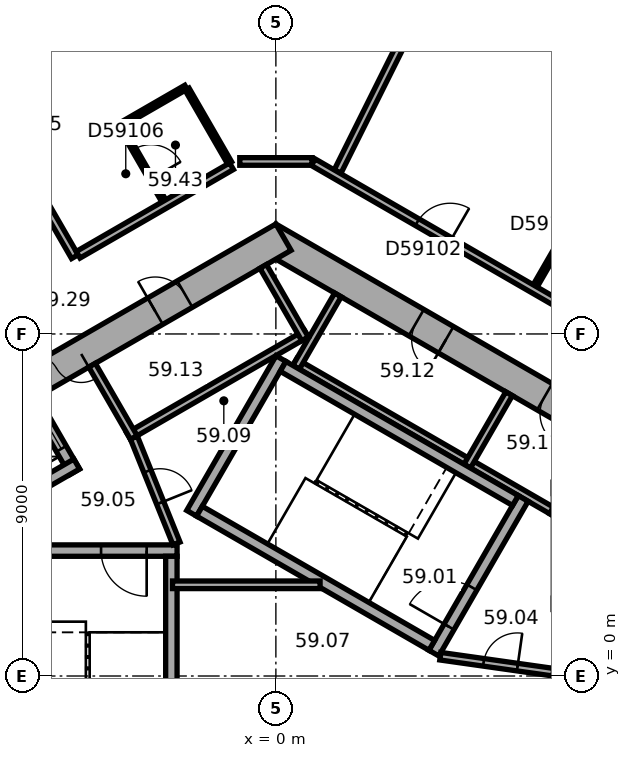
"""IFC4 building model, lengths in metres.
Left out: names, types, materials, properties, quantities, classifications, styles, units other than length and angle.
Written with IfcOpenShell. Run it as: python <this file> out.ifc"""

import sys

from ifc_helpers import new_model, si_unit, direction, frame, frame_2d, origin, place, context, subcontext, project, spatial, rectangle, extrude, element, fill, save


model = new_model("IFC4")
c1 = context("Model", 3, precision=1e-05, world=origin(), true_north=direction((0.0, 1.0)))
c2 = subcontext(c1, "Body", "Model", "MODEL_VIEW")
j1 = project(units=[si_unit("LENGTHUNIT", "METRE"), si_unit("PLANEANGLEUNIT", "RADIAN")], contexts=[c1])
p1 = place(None, origin())
s1 = spatial("IfcSite", under=j1, at=p1, CompositionType="ELEMENT")
p2 = place(p1, origin())
s2 = spatial("IfcBuilding", under=s1, at=p2, CompositionType="ELEMENT")
p3 = place(p2, frame((0.0, 0.0, 240.2)))
s3 = spatial("IfcBuildingStorey", under=s2, at=p3, CompositionType="ELEMENT", Elevation=240.2)
p4 = place(p3, frame((10.1, 5.6, 0.0), z_axis=(0.0, 0.0, 1.0), x_axis=(-0.866023897231, 0.500002609418, 0.0)))
e1 = element("IfcWall", 1, at=p4, inside=s3, PredefinedType="SHEAR", context=c2, shape_type="SweptSolid", body=[
    extrude(rectangle(XDim=11.894, YDim=0.8, at=frame_2d((5.947, 0.0))), origin(), (0.0, 0.0, 1.0), 3.7),
])
p5 = place(p4, frame((2.597, 0.0, 0.0)))
e2 = element("IfcOpeningElement", 2, at=p5, cuts=e1, PredefinedType="OPENING", context=c2, shape_type="SweptSolid", body=[
    extrude(rectangle(XDim=0.9, YDim=2.1, at=frame_2d((0.45, 1.05))), frame((0.0, 0.41, 0.0), z_axis=(0.0, -1.0, 0.0), x_axis=(1.0, 0.0, 0.0)), (0.0, 0.0, 1.0), 0.82),
])
p6 = place(p4, frame((6.497, 0.0, 0.0)))
e3 = element("IfcOpeningElement", 3, at=p6, cuts=e1, PredefinedType="OPENING", context=c2, shape_type="SweptSolid", body=[
    extrude(rectangle(XDim=0.9, YDim=2.1, at=frame_2d((0.45, 1.05))), frame((0.0, 0.41, 0.0), z_axis=(0.0, -1.0, 0.0), x_axis=(1.0, 0.0, 0.0)), (0.0, 0.0, 1.0), 0.82),
])
p7 = place(p3, frame((0.2, 11.547, 0.0), z_axis=(0.0, 0.0, 1.0), x_axis=(-0.866023897231, -0.500002609418, 0.0)))
e4 = element("IfcWall", 4, at=p7, inside=s3, PredefinedType="SHEAR", context=c2, shape_type="SweptSolid", body=[
    extrude(rectangle(XDim=11.894, YDim=0.8, at=frame_2d((5.947, 0.0))), origin(), (0.0, 0.0, 1.0), 3.7),
])
p8 = place(p7, frame((6.147, 0.0, 0.0)))
e5 = element("IfcOpeningElement", 5, at=p8, cuts=e4, PredefinedType="OPENING", context=c2, shape_type="SweptSolid", body=[
    extrude(rectangle(XDim=1.5, YDim=2.1, at=frame_2d((0.75, 1.05))), frame((0.0, 0.41, 0.0), z_axis=(0.0, -1.0, 0.0), x_axis=(1.0, 0.0, 0.0)), (0.0, 0.0, 1.0), 0.82),
])
p9 = place(p7, frame((2.997, 0.0, 0.0)))
e6 = element("IfcOpeningElement", 6, at=p9, cuts=e4, PredefinedType="OPENING", context=c2, shape_type="SweptSolid", body=[
    extrude(rectangle(XDim=0.9, YDim=2.1, at=frame_2d((0.45, 1.05))), frame((0.0, 0.41, 0.0), z_axis=(0.0, -1.0, 0.0), x_axis=(1.0, 0.0, 0.0)), (0.0, 0.0, 1.0), 0.82),
])
p10 = place(p3, frame((18.299, 13.727, 0.0), z_axis=(0.0, 0.0, 1.0), x_axis=(-0.894934554817, 0.44619742558, 0.0)))
e7 = element("IfcWall", 7, at=p10, inside=s3, PredefinedType="STANDARD", context=c2, shape_type="SweptSolid", body=[
    extrude(rectangle(XDim=18.841, YDim=0.2, at=frame_2d((9.421, 0.0))), origin(), (0.0, 0.0, 1.0), 3.7),
])
p11 = place(p10, frame((1.253, 0.0, 0.9)))
e8 = element("IfcOpeningElement", 8, at=p11, cuts=e7, PredefinedType="OPENING", context=c2, shape_type="SweptSolid", body=[
    extrude(rectangle(XDim=2.2, YDim=2.0, at=frame_2d((1.1, 1.0))), frame((0.0, 0.11, 0.0), z_axis=(0.0, -1.0, 0.0), x_axis=(1.0, 0.0, 0.0)), (0.0, 0.0, 1.0), 0.22),
])
p12 = place(p10, frame((4.786, 0.0, 0.9)))
e9 = element("IfcOpeningElement", 9, at=p12, cuts=e7, PredefinedType="OPENING", context=c2, shape_type="SweptSolid", body=[
    extrude(rectangle(XDim=2.2, YDim=2.0, at=frame_2d((1.1, 1.0))), frame((0.0, 0.11, 0.0), z_axis=(0.0, -1.0, 0.0), x_axis=(1.0, 0.0, 0.0)), (0.0, 0.0, 1.0), 0.22),
])
p13 = place(p10, frame((8.32, 0.0, 0.9)))
e10 = element("IfcOpeningElement", 10, at=p13, cuts=e7, PredefinedType="OPENING", context=c2, shape_type="SweptSolid", body=[
    extrude(rectangle(XDim=2.2, YDim=2.0, at=frame_2d((1.1, 1.0))), frame((0.0, 0.11, 0.0), z_axis=(0.0, -1.0, 0.0), x_axis=(1.0, 0.0, 0.0)), (0.0, 0.0, 1.0), 0.22),
])
p14 = place(p10, frame((11.854, 0.0, 0.9)))
e11 = element("IfcOpeningElement", 11, at=p14, cuts=e7, PredefinedType="OPENING", context=c2, shape_type="SweptSolid", body=[
    extrude(rectangle(XDim=2.2, YDim=2.0, at=frame_2d((1.1, 1.0))), frame((0.0, 0.11, 0.0), z_axis=(0.0, -1.0, 0.0), x_axis=(1.0, 0.0, 0.0)), (0.0, 0.0, 1.0), 0.22),
])
p15 = place(p10, frame((15.387, 0.0, 0.9)))
e12 = element("IfcOpeningElement", 12, at=p15, cuts=e7, PredefinedType="OPENING", context=c2, shape_type="SweptSolid", body=[
    extrude(rectangle(XDim=2.2, YDim=2.0, at=frame_2d((1.1, 1.0))), frame((0.0, 0.11, 0.0), z_axis=(0.0, -1.0, 0.0), x_axis=(1.0, 0.0, 0.0)), (0.0, 0.0, 1.0), 0.22),
])
p16 = place(p3, frame((-2.786, 22.005, 0.0), z_axis=(0.0, 0.0, 1.0), x_axis=(-0.866026555358, -0.49999800541, 0.0)))
e13 = element("IfcWall", 13, at=p16, inside=s3, PredefinedType="STANDARD", context=c2, shape_type="SweptSolid", body=[
    extrude(rectangle(XDim=18.841, YDim=0.2, at=frame_2d((9.421, 0.0))), origin(), (0.0, 0.0, 1.0), 3.7),
])
p17 = place(p16, frame((1.254, 0.0, 0.9)))
e14 = element("IfcOpeningElement", 14, at=p17, cuts=e13, PredefinedType="OPENING", context=c2, shape_type="SweptSolid", body=[
    extrude(rectangle(XDim=2.2, YDim=2.0, at=frame_2d((1.1, 1.0))), frame((0.0, 0.11, 0.0), z_axis=(0.0, -1.0, 0.0), x_axis=(1.0, 0.0, 0.0)), (0.0, 0.0, 1.0), 0.22),
])
p18 = place(p16, frame((4.788, 0.0, 0.9)))
e15 = element("IfcOpeningElement", 15, at=p18, cuts=e13, PredefinedType="OPENING", context=c2, shape_type="SweptSolid", body=[
    extrude(rectangle(XDim=2.2, YDim=2.0, at=frame_2d((1.1, 1.0))), frame((0.0, 0.11, 0.0), z_axis=(0.0, -1.0, 0.0), x_axis=(1.0, 0.0, 0.0)), (0.0, 0.0, 1.0), 0.22),
])
p19 = place(p16, frame((8.321, 0.0, 0.9)))
e16 = element("IfcOpeningElement", 16, at=p19, cuts=e13, PredefinedType="OPENING", context=c2, shape_type="SweptSolid", body=[
    extrude(rectangle(XDim=2.2, YDim=2.0, at=frame_2d((1.1, 1.0))), frame((0.0, 0.11, 0.0), z_axis=(0.0, -1.0, 0.0), x_axis=(1.0, 0.0, 0.0)), (0.0, 0.0, 1.0), 0.22),
])
p20 = place(p16, frame((11.855, 0.0, 0.9)))
e17 = element("IfcOpeningElement", 17, at=p20, cuts=e13, PredefinedType="OPENING", context=c2, shape_type="SweptSolid", body=[
    extrude(rectangle(XDim=2.2, YDim=2.0, at=frame_2d((1.1, 1.0))), frame((0.0, 0.11, 0.0), z_axis=(0.0, -1.0, 0.0), x_axis=(1.0, 0.0, 0.0)), (0.0, 0.0, 1.0), 0.22),
])
p21 = place(p16, frame((15.389, 0.0, 0.9)))
e18 = element("IfcOpeningElement", 18, at=p21, cuts=e13, PredefinedType="OPENING", context=c2, shape_type="SweptSolid", body=[
    extrude(rectangle(XDim=2.2, YDim=2.0, at=frame_2d((1.1, 1.0))), frame((0.0, 0.11, 0.0), z_axis=(0.0, -1.0, 0.0), x_axis=(1.0, 0.0, 0.0)), (0.0, 0.0, 1.0), 0.22),
])
p22 = place(p3, frame((7.424, 4.259, 0.0), z_axis=(0.0, 0.0, 1.0), x_axis=(-0.866026010844, 0.49999894854, 0.0)))
e19 = element("IfcWall", 19, at=p22, inside=s3, PredefinedType="PARTITIONING", context=c2, shape_type="SweptSolid", body=[
    extrude(rectangle(XDim=8.0, YDim=0.2, at=frame_2d((4.0, 0.0))), origin(), (0.0, 0.0, 1.0), 3.42),
])
for number, where, z_axis, x_axis in (
    (20, (7.287, 4.222, 0.0), (0.0, 0.0, 1.0), (0.5, 0.866, 0.0)),
    (21, (5.036, 5.522, 0.0), (0.0, 0.0, 1.0), (0.5, 0.866, 0.0)),
    (22, (0.532, 8.122, 0.0), (0.0, 0.0, 1.0), (0.5, 0.866, 0.0)),
):
    element("IfcWall", number, at=place(p3, frame(where, z_axis=z_axis, x_axis=x_axis)), inside=s3, PredefinedType="PARTITIONING", context=c2, shape_type="SweptSolid", body=[
        extrude(rectangle(XDim=2.2, YDim=0.2, at=frame_2d((1.1, 0.0))), origin(), (0.0, 0.0, 1.0), 3.42),
    ])
p23 = place(p3, frame((0.803, 9.009, 0.0), z_axis=(0.0, 0.0, 1.0), x_axis=(-0.866028230842, -0.499995103361, 0.0)))
e23 = element("IfcWall", 23, at=p23, inside=s3, PredefinedType="PARTITIONING", context=c2, shape_type="SweptSolid", body=[
    extrude(rectangle(XDim=5.4, YDim=0.2, at=frame_2d((2.7, 0.0))), origin(), (0.0, 0.0, 1.0), 3.42),
])
p24 = place(p3, frame((0.767, 8.872, 0.0), z_axis=(0.0, 0.0, 1.0), x_axis=(-0.499994660107, 0.866028486751, 0.0)))
e24 = element("IfcWall", 24, at=p24, inside=s3, PredefinedType="PARTITIONING", context=c2, shape_type="SweptSolid", body=[
    extrude(rectangle(XDim=2.2, YDim=0.2, at=frame_2d((1.1, 0.0))), origin(), (0.0, 0.0, 1.0), 3.42),
])
p25 = place(p3, frame((-3.737, 6.272, 0.0), z_axis=(0.0, 0.0, 1.0), x_axis=(-0.50002983664, 0.866008176907, 0.0)))
e25 = element("IfcWall", 25, at=p25, inside=s3, PredefinedType="PARTITIONING", context=c2, shape_type="SweptSolid", body=[
    extrude(rectangle(XDim=2.2, YDim=0.2, at=frame_2d((1.1, 0.0))), origin(), (0.0, 0.0, 1.0), 3.42),
])
p26 = place(p3, frame((4.158, 0.602, 0.0), z_axis=(0.0, 0.0, 1.0), x_axis=(0.499977259774, 0.866038532462, 0.0)))
e26 = element("IfcWall", 26, at=p26, inside=s3, PredefinedType="SHEAR", context=c2, shape_type="SweptSolid", body=[
    extrude(rectangle(XDim=4.7, YDim=0.3, at=frame_2d((2.35, 0.0))), origin(), (0.0, 0.0, 1.0), 3.42),
])
p27 = place(p26, frame((0.8, 0.0, 0.0)))
e27 = element("IfcOpeningElement", 27, at=p27, cuts=e26, PredefinedType="OPENING", context=c2, shape_type="SweptSolid", body=[
    extrude(rectangle(XDim=1.2, YDim=2.1, at=frame_2d((0.6, 1.05))), frame((0.0, 0.16, 0.0), z_axis=(0.0, -1.0, 0.0), x_axis=(1.0, 0.0, 0.0)), (0.0, 0.0, 1.0), 0.32),
])
p28 = place(p3, frame((-2.216, 4.282, 0.0), z_axis=(0.0, 0.0, 1.0), x_axis=(0.499977259774, 0.866038532462, 0.0)))
e28 = element("IfcWall", 28, at=p28, inside=s3, PredefinedType="SHEAR", context=c2, shape_type="SweptSolid", body=[
    extrude(rectangle(XDim=4.7, YDim=0.3, at=frame_2d((2.35, 0.0))), origin(), (0.0, 0.0, 1.0), 3.42),
])
for number, where, z_axis, x_axis in (
    (29, (4.103, 0.807, 0.0), (0.0, 0.0, 1.0), (-0.866, 0.5, 0.0)),
    (30, (6.303, 4.617, 0.0), (0.0, 0.0, 1.0), (-0.866, 0.5, 0.0)),
):
    element("IfcWall", number, at=place(p3, frame(where, z_axis=z_axis, x_axis=x_axis)), inside=s3, PredefinedType="SHEAR", context=c2, shape_type="SweptSolid", body=[
        extrude(rectangle(XDim=7.06, YDim=0.3, at=frame_2d((3.53, 0.0))), origin(), (0.0, 0.0, 1.0), 3.42),
    ])
p29 = place(p3, frame((-2.6, 3.3, 0.0), z_axis=(0.0, 0.0, 1.0), x_axis=(-1.0, 0.0, 0.0)))
e31 = element("IfcWall", 31, at=p29, inside=s3, PredefinedType="SHEAR", context=c2, shape_type="SweptSolid", body=[
    extrude(rectangle(XDim=4.7, YDim=0.3, at=frame_2d((2.35, 0.0))), origin(), (0.0, 0.0, 1.0), 3.42),
])
p30 = place(p29, frame((0.8, 0.0, 0.0)))
e32 = element("IfcOpeningElement", 32, at=p30, cuts=e31, PredefinedType="OPENING", context=c2, shape_type="SweptSolid", body=[
    extrude(rectangle(XDim=1.2, YDim=2.1, at=frame_2d((0.6, 1.05))), frame((0.0, 0.16, 0.0), z_axis=(0.0, -1.0, 0.0), x_axis=(1.0, 0.0, 0.0)), (0.0, 0.0, 1.0), 0.32),
])
p31 = place(p3, frame((-2.75, 3.15, 0.0), z_axis=(0.0, 0.0, 1.0), x_axis=(0.0, -1.0, 0.0)))
e33 = element("IfcWall", 33, at=p31, inside=s3, PredefinedType="SHEAR", context=c2, shape_type="SweptSolid", body=[
    extrude(rectangle(XDim=7.06, YDim=0.3, at=frame_2d((3.53, 0.0))), origin(), (0.0, 0.0, 1.0), 3.42),
])
p32 = place(p3, frame((4.327, 0.521, 0.0), z_axis=(0.0, 0.0, 1.0), x_axis=(0.990124376366, -0.14019172346, 0.0)))
e34 = element("IfcWall", 34, at=p32, inside=s3, PredefinedType="PARTITIONING", context=c2, shape_type="SweptSolid", body=[
    extrude(rectangle(XDim=3.002, YDim=0.2, at=frame_2d((1.501, 0.0))), origin(), (0.0, 0.0, 1.0), 3.42),
])
p33 = place(p32, frame((1.15, 0.0, 0.0)))
e35 = element("IfcOpeningElement", 35, at=p33, cuts=e34, PredefinedType="OPENING", context=c2, shape_type="SweptSolid", body=[
    extrude(rectangle(XDim=0.9, YDim=2.1, at=frame_2d((0.45, 1.05))), frame((0.0, 0.11, 0.0), z_axis=(0.0, -1.0, 0.0), x_axis=(1.0, 0.0, 0.0)), (0.0, 0.0, 1.0), 0.22),
])
p34 = place(p3, frame((-5.295, 5.372, 0.0), z_axis=(0.0, 0.0, 1.0), x_axis=(-0.500077893725, 0.86598042715, 0.0)))
e36 = element("IfcWall", 36, at=p34, inside=s3, PredefinedType="SHEAR", context=c2, shape_type="SweptSolid", body=[
    extrude(rectangle(XDim=2.2, YDim=0.3, at=frame_2d((1.1, 0.0))), origin(), (0.0, 0.0, 1.0), 3.42),
])
p35 = place(p34, frame((0.7, 0.0, 0.0)))
e37 = element("IfcOpeningElement", 37, at=p35, cuts=e36, PredefinedType="OPENING", context=c2, shape_type="SweptSolid", body=[
    extrude(rectangle(XDim=1.1, YDim=2.1, at=frame_2d((0.55, 1.05))), frame((0.0, 0.16, 0.0), z_axis=(0.0, -1.0, 0.0), x_axis=(1.0, 0.0, 0.0)), (0.0, 0.0, 1.0), 0.32),
])
p36 = place(p3, frame((-5.24, 5.577, 0.0), z_axis=(0.0, 0.0, 1.0), x_axis=(-0.866014461049, -0.500018952895, 0.0)))
e38 = element("IfcWall", 38, at=p36, inside=s3, PredefinedType="SHEAR", context=c2, shape_type="SweptSolid", body=[
    extrude(rectangle(XDim=3.35, YDim=0.3, at=frame_2d((1.675, 0.0))), origin(), (0.0, 0.0, 1.0), 3.42),
])
p37 = place(p3, frame((-2.615, 3.487, 0.0), z_axis=(0.0, 0.0, 1.0), x_axis=(-0.373576831041, 0.92759924068, 0.0)))
e39 = element("IfcWall", 39, at=p37, inside=s3, PredefinedType="PARTITIONING", context=c2, shape_type="SweptSolid", body=[
    extrude(rectangle(XDim=3.002, YDim=0.2, at=frame_2d((1.501, 0.0))), origin(), (0.0, 0.0, 1.0), 3.42),
])
p38 = place(p37, frame((1.15, 0.0, 0.0)))
e40 = element("IfcOpeningElement", 40, at=p38, cuts=e39, PredefinedType="OPENING", context=c2, shape_type="SweptSolid", body=[
    extrude(rectangle(XDim=0.9, YDim=2.1, at=frame_2d((0.45, 1.05))), frame((0.0, 0.11, 0.0), z_axis=(0.0, -1.0, 0.0), x_axis=(1.0, 0.0, 0.0)), (0.0, 0.0, 1.0), 0.22),
])
p39 = place(p3, frame((-2.72, 2.4, 0.0), z_axis=(0.0, 0.0, 1.0), x_axis=(1.0, 0.0, 0.0)))
e41 = element("IfcWall", 41, at=p39, inside=s3, PredefinedType="PARTITIONING", context=c2, shape_type="SweptSolid", body=[
    extrude(rectangle(XDim=3.883, YDim=0.2, at=frame_2d((1.941, 0.0))), origin(), (0.0, 0.0, 1.0), 3.42),
])
p40 = place(p3, frame((-8.965, 17.399, 0.0), z_axis=(0.0, 0.0, 1.0), x_axis=(0.499993683172, -0.866029050776, 0.0)))
e42 = element("IfcWall", 42, at=p40, inside=s3, PredefinedType="PARTITIONING", context=c2, shape_type="SweptSolid", body=[
    extrude(rectangle(XDim=7.35, YDim=0.2, at=frame_2d((3.675, 0.0))), origin(), (0.0, 0.0, 1.0), 2.87),
])
p41 = place(p40, frame((3.175, 0.0, 0.0)))
e43 = element("IfcOpeningElement", 43, at=p41, cuts=e42, PredefinedType="OPENING", context=c2, shape_type="SweptSolid", body=[
    extrude(rectangle(XDim=1.0, YDim=2.1, at=frame_2d((0.5, 1.05))), frame((0.0, 0.11, 0.0), z_axis=(0.0, -1.0, 0.0), x_axis=(1.0, 0.0, 0.0)), (0.0, 0.0, 1.0), 0.22),
])
p42 = place(p3, frame((-4.099, 14.492, 0.0), z_axis=(0.0, 0.0, 1.0), x_axis=(0.866041268327, 0.499972520799, 0.0)))
e44 = element("IfcWall", 44, at=p42, inside=s3, PredefinedType="PARTITIONING", context=c2, shape_type="SweptSolid", body=[
    extrude(rectangle(XDim=2.0, YDim=0.12, at=frame_2d((1.0, 0.0))), origin(), (0.0, 0.0, 1.0), 3.42),
])
p43 = place(p3, frame((-2.948, 12.5, 0.0), z_axis=(0.0, 0.0, 1.0), x_axis=(-0.500077830873, 0.865980463445, 0.0)))
e45 = element("IfcWall", 45, at=p43, inside=s3, PredefinedType="PARTITIONING", context=c2, shape_type="SweptSolid", body=[
    extrude(rectangle(XDim=2.24, YDim=0.12, at=frame_2d((1.12, 0.0))), origin(), (0.0, 0.0, 1.0), 3.42),
])
p44 = place(p43, frame((0.67, 0.0, 0.0)))
e46 = element("IfcOpeningElement", 46, at=p44, cuts=e45, PredefinedType="OPENING", context=c2, shape_type="SweptSolid", body=[
    extrude(rectangle(XDim=0.9, YDim=2.1, at=frame_2d((0.45, 1.05))), frame((0.0, 0.07, 0.0), z_axis=(0.0, -1.0, 0.0), x_axis=(1.0, 0.0, 0.0)), (0.0, 0.0, 1.0), 0.14),
])
p45 = place(p3, frame((-2.336, 15.44, 0.0), z_axis=(0.0, 0.0, 1.0), x_axis=(0.49999608499, -0.866027664105, 0.0)))
e47 = element("IfcWall", 47, at=p45, inside=s3, PredefinedType="PARTITIONING", context=c2, shape_type="SweptSolid", body=[
    extrude(rectangle(XDim=2.24, YDim=0.12, at=frame_2d((1.12, 0.0))), origin(), (0.0, 0.0, 1.0), 3.42),
])
p46 = place(p3, frame((-1.167, 13.414, 0.0), z_axis=(0.0, 0.0, 1.0), x_axis=(-0.866023347809, -0.500003561037, 0.0)))
e48 = element("IfcWall", 48, at=p46, inside=s3, PredefinedType="PARTITIONING", context=c2, shape_type="SweptSolid", body=[
    extrude(rectangle(XDim=4.661, YDim=0.2, at=frame_2d((2.331, 0.0))), origin(), (0.0, 0.0, 1.0), 3.42),
])
p47 = place(p3, frame((0.95, 13.539, 0.0), z_axis=(0.0, 0.0, 1.0), x_axis=(-1.0, 0.0, 0.0)))
e49 = element("IfcWall", 49, at=p47, inside=s3, PredefinedType="PARTITIONING", context=c2, shape_type="SweptSolid", body=[
    extrude(rectangle(XDim=1.9, YDim=0.2, at=frame_2d((0.95, 0.0))), origin(), (0.0, 0.0, 1.0), 3.42),
])
p48 = place(p3, frame((4.723, 19.49, 0.0), z_axis=(0.0, 0.0, 1.0), x_axis=(-0.446186614574, -0.894939944898, 0.0)))
e50 = element("IfcWall", 50, at=p48, inside=s3, PredefinedType="PARTITIONING", context=c2, shape_type="SweptSolid", body=[
    extrude(rectangle(XDim=6.944, YDim=0.2, at=frame_2d((3.472, 0.0))), origin(), (0.0, 0.0, 1.0), 2.87),
])
p49 = place(p3, frame((6.823, 10.264, 0.0), z_axis=(0.0, 0.0, 1.0), x_axis=(0.49999285859, 0.86602952684, 0.0)))
e51 = element("IfcWall", 51, at=p49, inside=s3, PredefinedType="PARTITIONING", context=c2, shape_type="SweptSolid", body=[
    extrude(rectangle(XDim=3.1, YDim=0.12, at=frame_2d((1.55, 0.0))), origin(), (0.0, 0.0, 1.0), 2.87),
])
p50 = place(p49, frame((1.1, 0.0, 0.0)))
e52 = element("IfcOpeningElement", 52, at=p50, cuts=e51, PredefinedType="OPENING", context=c2, shape_type="SweptSolid", body=[
    extrude(rectangle(XDim=0.9, YDim=2.1, at=frame_2d((0.45, 1.05))), frame((0.0, 0.07, 0.0), z_axis=(0.0, -1.0, 0.0), x_axis=(1.0, 0.0, 0.0)), (0.0, 0.0, 1.0), 0.14),
])
p51 = place(p3, frame((9.198, 8.777, 0.0), z_axis=(0.0, 0.0, 1.0), x_axis=(-0.866026106692, 0.499998782526, 0.0)))
e53 = element("IfcWall", 53, at=p51, inside=s3, PredefinedType="PARTITIONING", context=c2, shape_type="SweptSolid", body=[
    extrude(rectangle(XDim=9.483, YDim=0.2, at=frame_2d((4.742, 0.0))), origin(), (0.0, 0.0, 1.0), 3.42),
])
p52 = place(p51, frame((5.325, 0.0, 0.0)))
e54 = element("IfcOpeningElement", 54, at=p52, cuts=e53, PredefinedType="OPENING", context=c2, shape_type="SweptSolid", body=[
    extrude(rectangle(XDim=1.0, YDim=2.1, at=frame_2d((0.5, 1.05))), frame((0.0, 0.11, 0.0), z_axis=(0.0, -1.0, 0.0), x_axis=(1.0, 0.0, 0.0)), (0.0, 0.0, 1.0), 0.22),
])
p53 = place(p8, origin())
e55 = element("IfcDoor", 55, at=p53, inside=s3, OperationType="DOUBLE_DOOR_SINGLE_SWING", PredefinedType="DOOR", context=c2, shape_type="SweptSolid", body=[
    extrude(rectangle(XDim=1.5, YDim=2.1, at=frame_2d((0.75, 1.05))), frame((0.0, 0.025, 0.0), z_axis=(0.0, -1.0, 0.0), x_axis=(1.0, 0.0, 0.0)), (0.0, 0.0, 1.0), 0.05),
])
fill(e5, e55)
p54 = place(p27, origin())
e56 = element("IfcDoor", 56, at=p54, inside=s3, OperationType="SINGLE_SWING_RIGHT", PredefinedType="DOOR", context=c2, shape_type="SweptSolid", body=[
    extrude(rectangle(XDim=1.2, YDim=2.1, at=frame_2d((0.6, 1.05))), frame((0.0, 0.025, 0.0), z_axis=(0.0, -1.0, 0.0), x_axis=(1.0, 0.0, 0.0)), (0.0, 0.0, 1.0), 0.05),
])
fill(e27, e56)
p55 = place(p30, origin())
e57 = element("IfcDoor", 57, at=p55, inside=s3, OperationType="SINGLE_SWING_RIGHT", PredefinedType="DOOR", context=c2, shape_type="SweptSolid", body=[
    extrude(rectangle(XDim=1.2, YDim=2.1, at=frame_2d((0.6, 1.05))), frame((0.0, 0.025, 0.0), z_axis=(0.0, -1.0, 0.0), x_axis=(1.0, 0.0, 0.0)), (0.0, 0.0, 1.0), 0.05),
])
fill(e32, e57)
p56 = place(p33, origin())
e58 = element("IfcDoor", 58, at=p56, inside=s3, OperationType="SINGLE_SWING_LEFT", PredefinedType="DOOR", context=c2, shape_type="SweptSolid", body=[
    extrude(rectangle(XDim=0.9, YDim=2.1, at=frame_2d((0.45, 1.05))), frame((0.0, 0.025, 0.0), z_axis=(0.0, -1.0, 0.0), x_axis=(1.0, 0.0, 0.0)), (0.0, 0.0, 1.0), 0.05),
])
fill(e35, e58)
p57 = place(p38, origin())
e59 = element("IfcDoor", 59, at=p57, inside=s3, OperationType="SINGLE_SWING_LEFT", PredefinedType="DOOR", context=c2, shape_type="SweptSolid", body=[
    extrude(rectangle(XDim=0.9, YDim=2.1, at=frame_2d((0.45, 1.05))), frame((0.0, 0.025, 0.0), z_axis=(0.0, -1.0, 0.0), x_axis=(1.0, 0.0, 0.0)), (0.0, 0.0, 1.0), 0.05),
])
fill(e40, e59)
p58 = place(p5, origin())
e60 = element("IfcDoor", 60, at=p58, inside=s3, OperationType="SINGLE_SWING_LEFT", PredefinedType="DOOR", context=c2, shape_type="SweptSolid", body=[
    extrude(rectangle(XDim=0.9, YDim=2.1, at=frame_2d((0.45, 1.05))), frame((0.0, 0.025, 0.0), z_axis=(0.0, -1.0, 0.0), x_axis=(1.0, 0.0, 0.0)), (0.0, 0.0, 1.0), 0.05),
])
fill(e2, e60)
p59 = place(p6, origin())
e61 = element("IfcDoor", 61, at=p59, inside=s3, OperationType="SINGLE_SWING_LEFT", PredefinedType="DOOR", context=c2, shape_type="SweptSolid", body=[
    extrude(rectangle(XDim=0.9, YDim=2.1, at=frame_2d((0.45, 1.05))), frame((0.0, 0.025, 0.0), z_axis=(0.0, -1.0, 0.0), x_axis=(1.0, 0.0, 0.0)), (0.0, 0.0, 1.0), 0.05),
])
fill(e3, e61)
p60 = place(p9, origin())
e62 = element("IfcDoor", 62, at=p60, inside=s3, OperationType="SINGLE_SWING_LEFT", PredefinedType="DOOR", context=c2, shape_type="SweptSolid", body=[
    extrude(rectangle(XDim=0.9, YDim=2.1, at=frame_2d((0.45, 1.05))), frame((0.0, 0.025, 0.0), z_axis=(0.0, -1.0, 0.0), x_axis=(1.0, 0.0, 0.0)), (0.0, 0.0, 1.0), 0.05),
])
fill(e6, e62)
p61 = place(p35, origin())
e63 = element("IfcDoor", 63, at=p61, inside=s3, OperationType="DOUBLE_DOOR_SLIDING", PredefinedType="DOOR", context=c2, shape_type="SweptSolid", body=[
    extrude(rectangle(XDim=1.1, YDim=2.1, at=frame_2d((0.55, 1.05))), frame((0.0, 0.025, 0.0), z_axis=(0.0, -1.0, 0.0), x_axis=(1.0, 0.0, 0.0)), (0.0, 0.0, 1.0), 0.05),
])
fill(e37, e63)
p62 = place(p52, origin())
e64 = element("IfcDoor", 64, at=p62, inside=s3, OperationType="SINGLE_SWING_LEFT", PredefinedType="DOOR", context=c2, shape_type="SweptSolid", body=[
    extrude(rectangle(XDim=1.0, YDim=2.1, at=frame_2d((0.5, 1.05))), frame((0.0, 0.025, 0.0), z_axis=(0.0, -1.0, 0.0), x_axis=(1.0, 0.0, 0.0)), (0.0, 0.0, 1.0), 0.05),
])
fill(e54, e64)
p63 = place(p44, origin())
e65 = element("IfcDoor", 65, at=p63, inside=s3, OperationType="SINGLE_SWING_LEFT", PredefinedType="DOOR", context=c2, shape_type="SweptSolid", body=[
    extrude(rectangle(XDim=0.9, YDim=2.1, at=frame_2d((0.45, 1.05))), frame((0.0, 0.025, 0.0), z_axis=(0.0, -1.0, 0.0), x_axis=(1.0, 0.0, 0.0)), (0.0, 0.0, 1.0), 0.05),
])
fill(e46, e65)
save(model, sys.argv[1])
